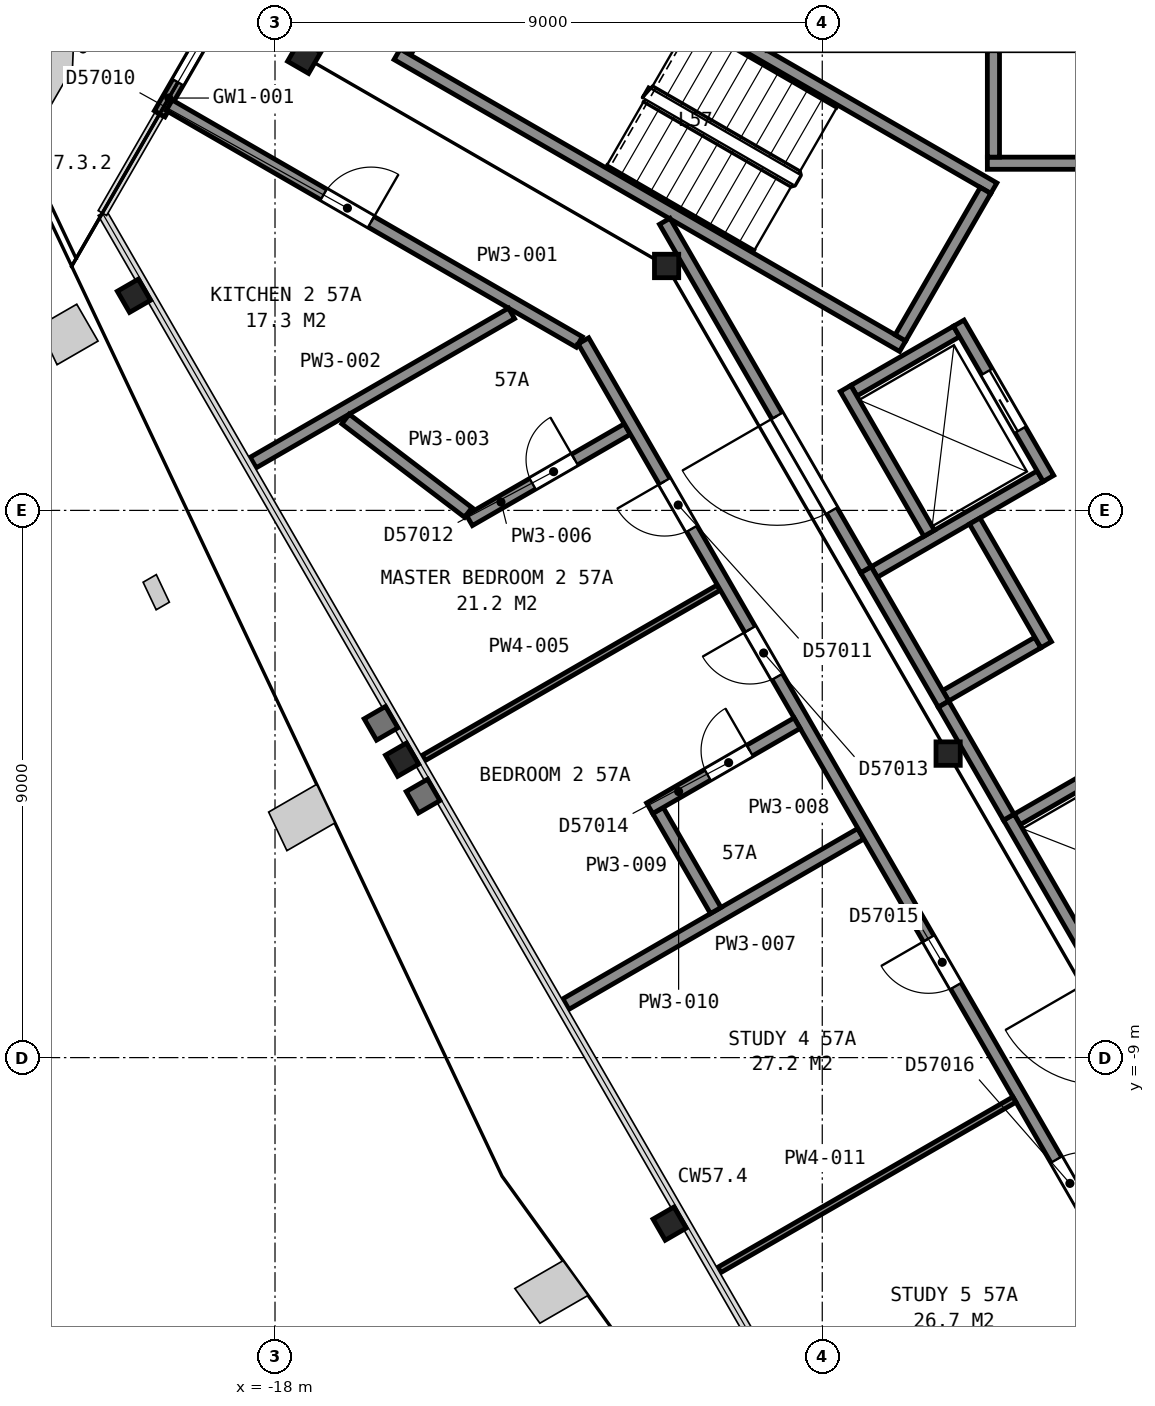
"""IFC4 building model, lengths in metres.
Left out: names, types, materials, properties, quantities, classifications, styles, units other than length and angle.
Written with IfcOpenShell. Run it as: python <this file> out.ifc"""

import sys

from ifc_helpers import new_model, si_unit, direction, frame, frame_2d, origin, origin_2d, place, context, subcontext, project, spatial, rectangle, i_section, extrude, element, fill, save


model = new_model("IFC4")
c1 = context("Model", 3, precision=1e-05, world=origin(), true_north=direction((0.0, 1.0)))
c2 = subcontext(c1, "Body", "Model", "MODEL_VIEW")
j1 = project(units=[si_unit("LENGTHUNIT", "METRE"), si_unit("PLANEANGLEUNIT", "RADIAN")], contexts=[c1])
p1 = place(None, origin())
s1 = spatial("IfcSite", under=j1, at=p1, CompositionType="ELEMENT")
p2 = place(p1, origin())
s2 = spatial("IfcBuilding", under=s1, at=p2, CompositionType="ELEMENT")
p3 = place(p2, frame((0.0, 0.0, 228.6)))
s3 = spatial("IfcBuildingStorey", under=s2, at=p3, CompositionType="ELEMENT", Elevation=228.6)
p4 = place(p3, frame((-20.32, 3.53, 0.0), z_axis=(0.0, 0.0, 1.0), x_axis=(-0.5, 0.866025403784, 0.0)))
e1 = element("IfcColumn", 1, at=p4, inside=s3, PredefinedType="COLUMN", context=c2, shape_type="SweptSolid", body=[
    extrude(i_section(OverallWidth=0.401, OverallDepth=0.399, WebThickness=0.025, FlangeThickness=0.04, FilletRadius=0.015, at=origin_2d()), origin(), (0.0, 0.0, 1.0), 3.66),
])
for number, where, z_axis, x_axis in (
    (2, (-15.91, -4.1, 0.0), (0.0, 0.0, 1.0), (-0.5, 0.866, 0.0)),
    (3, (-11.51, -11.73, 0.0), (0.0, 0.0, 1.0), (-0.5, 0.866, 0.0)),
):
    element("IfcColumn", number, at=place(p3, frame(where, z_axis=z_axis, x_axis=x_axis)), inside=s3, PredefinedType="COLUMN", context=c2, shape_type="SweptSolid", body=[
        extrude(i_section(OverallWidth=0.401, OverallDepth=0.399, WebThickness=0.025, FlangeThickness=0.04, FilletRadius=0.015, at=origin_2d()), origin(), (0.0, 0.0, 1.0), 3.665),
    ])
p5 = place(p3, frame((-17.52, 7.46, 0.0), z_axis=(0.0, 0.0, 1.0), x_axis=(0.5, 0.866025403784, 0.0)))
e4 = element("IfcColumn", 4, at=p5, inside=s3, PredefinedType="COLUMN", context=c2, shape_type="SweptSolid", body=[
    extrude(i_section(OverallWidth=0.401, OverallDepth=0.399, WebThickness=0.025, FlangeThickness=0.04, FilletRadius=0.015, at=origin_2d()), origin(), (0.0, 0.0, 1.0), 3.7),
])
for number, where, z_axis, x_axis in (
    (5, (-11.56, 4.02, 0.0), (0.0, 0.0, 1.0), (1.0, 0.0, 0.0)),
    (6, (-6.93, -4.0, 0.0), (0.0, 0.0, 1.0), (1.0, 0.0, 0.0)),
):
    element("IfcColumn", number, at=place(p3, frame(where, z_axis=z_axis, x_axis=x_axis)), inside=s3, PredefinedType="COLUMN", context=c2, shape_type="SweptSolid", body=[
        extrude(i_section(OverallWidth=0.399, OverallDepth=0.386, WebThickness=0.021, FlangeThickness=0.033, FilletRadius=0.015, at=origin_2d()), origin(), (0.0, 0.0, 1.0), 3.7),
    ])
p6 = place(p3, frame((-15.597, 13.97, 0.0), z_axis=(0.0, 0.0, 1.0), x_axis=(-0.500007509209, -0.866021068297, 0.0)))
e7 = element("IfcWall", 7, at=p6, inside=s3, PredefinedType="SOLIDWALL", context=c2, shape_type="SweptSolid", body=[
    extrude(rectangle(XDim=8.6, YDim=0.2, at=frame_2d((4.3, 0.0))), origin(), (0.0, 0.0, 1.0), 2.713),
])
p7 = place(p6, frame((0.6, 0.0, 0.9)))
e8 = element("IfcOpeningElement", 8, at=p7, cuts=e7, PredefinedType="OPENING", context=c2, shape_type="SweptSolid", body=[
    extrude(rectangle(XDim=1.0, YDim=1.5, at=frame_2d((0.5, 0.75))), frame((0.0, 0.11, 0.0), z_axis=(0.0, -1.0, 0.0), x_axis=(1.0, 0.0, 0.0)), (0.0, 0.0, 1.0), 0.22),
])
p8 = place(p6, frame((2.2, 0.0, 0.0)))
e9 = element("IfcOpeningElement", 9, at=p8, cuts=e7, PredefinedType="OPENING", context=c2, shape_type="SweptSolid", body=[
    extrude(rectangle(XDim=1.8, YDim=2.4, at=frame_2d((0.9, 1.2))), frame((0.0, 0.11, 0.0), z_axis=(0.0, -1.0, 0.0), x_axis=(1.0, 0.0, 0.0)), (0.0, 0.0, 1.0), 0.22),
])
p9 = place(p6, frame((4.6, 0.0, 0.0)))
e10 = element("IfcOpeningElement", 10, at=p9, cuts=e7, PredefinedType="OPENING", context=c2, shape_type="SweptSolid", body=[
    extrude(rectangle(XDim=1.8, YDim=2.4, at=frame_2d((0.9, 1.2))), frame((0.0, 0.11, 0.0), z_axis=(0.0, -1.0, 0.0), x_axis=(1.0, 0.0, 0.0)), (0.0, 0.0, 1.0), 0.22),
])
p10 = place(p6, frame((7.0, 0.0, 0.9)))
e11 = element("IfcOpeningElement", 11, at=p10, cuts=e7, PredefinedType="OPENING", context=c2, shape_type="SweptSolid", body=[
    extrude(rectangle(XDim=1.0, YDim=1.5, at=frame_2d((0.5, 0.75))), frame((0.0, 0.11, 0.0), z_axis=(0.0, -1.0, 0.0), x_axis=(1.0, 0.0, 0.0)), (0.0, 0.0, 1.0), 0.22),
])
p11 = place(p3, frame((-14.455, 9.962, 0.0), z_axis=(0.0, 0.0, 1.0), x_axis=(-0.500049511043, -0.865996816683, 0.0)))
e12 = element("IfcWall", 12, at=p11, inside=s3, PredefinedType="PARTITIONING", context=c2, shape_type="SweptSolid", body=[
    extrude(rectangle(XDim=2.8, YDim=0.2, at=frame_2d((1.4, 0.0))), origin(), (0.0, 0.0, 1.0), 3.45),
])
p12 = place(p11, frame((0.85, 0.0, 0.0)))
e13 = element("IfcOpeningElement", 13, at=p12, cuts=e12, PredefinedType="OPENING", context=c2, shape_type="SweptSolid", body=[
    extrude(rectangle(XDim=1.1, YDim=2.1, at=frame_2d((0.55, 1.05))), frame((0.0, 0.11, 0.0), z_axis=(0.0, -1.0, 0.0), x_axis=(1.0, 0.0, 0.0)), (0.0, 0.0, 1.0), 0.22),
])
for number, where, z_axis, x_axis in (
    (14, (-7.678, 2.701, 0.0), (0.0, 0.0, 1.0), (-0.866, 0.5, 0.0)),
    (15, (-6.178, 5.299, 0.0), (0.0, 0.0, 1.0), (-0.866, 0.5, 0.0)),
):
    element("IfcWall", number, at=place(p3, frame(where, z_axis=z_axis, x_axis=x_axis)), inside=s3, PredefinedType="PARTITIONING", context=c2, shape_type="SweptSolid", body=[
        extrude(rectangle(XDim=9.6, YDim=0.2, at=frame_2d((4.8, 0.0))), origin(), (0.0, 0.0, 1.0), 3.45),
    ])
p13 = place(p3, frame((-6.315, 5.262, 0.0), z_axis=(0.0, 0.0, 1.0), x_axis=(-0.500049511043, -0.865996816683, 0.0)))
e16 = element("IfcWall", 16, at=p13, inside=s3, PredefinedType="PARTITIONING", context=c2, shape_type="SweptSolid", body=[
    extrude(rectangle(XDim=2.8, YDim=0.2, at=frame_2d((1.4, 0.0))), origin(), (0.0, 0.0, 1.0), 3.45),
])
p14 = place(p3, frame((-6.285, 5.71, 0.0), z_axis=(0.0, 0.0, 1.0), x_axis=(1.0, 0.0, 0.0)))
e17 = element("IfcWall", 17, at=p14, inside=s3, PredefinedType="PARTITIONING", context=c2, shape_type="SweptSolid", body=[
    extrude(rectangle(XDim=2.35, YDim=0.2, at=frame_2d((1.175, 0.0))), origin(), (0.0, 0.0, 1.0), 3.7),
])
for number, where, z_axis, x_axis in (
    (18, (-5.795, -5.083, 0.0), (0.0, 0.0, 1.0), (0.866, 0.5, 0.0)),
    (19, (-6.97, -3.048, 0.0), (0.0, 0.0, 1.0), (0.866, 0.5, 0.0)),
):
    element("IfcWall", number, at=place(p3, frame(where, z_axis=z_axis, x_axis=x_axis)), inside=s3, PredefinedType="PARTITIONING", context=c2, shape_type="SweptSolid", body=[
        extrude(rectangle(XDim=1.75, YDim=0.2, at=frame_2d((0.875, 0.0))), origin(), (0.0, 0.0, 1.0), 3.7),
    ])
p15 = place(p3, frame((-8.145, -1.013, 0.0), z_axis=(0.0, 0.0, 1.0), x_axis=(0.866016494683, 0.500015430699, 0.0)))
e20 = element("IfcWall", 20, at=p15, inside=s3, PredefinedType="PARTITIONING", context=c2, shape_type="SweptSolid", body=[
    extrude(rectangle(XDim=3.15, YDim=0.2, at=frame_2d((1.575, 0.0))), origin(), (0.0, 0.0, 1.0), 3.7),
])
p16 = place(p3, frame((-8.48, 1.969, 0.0), z_axis=(0.0, 0.0, 1.0), x_axis=(0.866000020948, 0.500043961785, 0.0)))
e21 = element("IfcWall", 21, at=p16, inside=s3, PredefinedType="PARTITIONING", context=c2, shape_type="SweptSolid", body=[
    extrude(rectangle(XDim=1.95, YDim=0.2, at=frame_2d((0.975, 0.0))), origin(), (0.0, 0.0, 1.0), 3.7),
])
p17 = place(p3, frame((-6.185, 5.81, 0.0), z_axis=(0.0, 0.0, 1.0), x_axis=(0.0, 1.0, 0.0)))
e22 = element("IfcWall", 22, at=p17, inside=s3, PredefinedType="PARTITIONING", context=c2, shape_type="SweptSolid", body=[
    extrude(rectangle(XDim=1.75, YDim=0.2, at=frame_2d((0.875, 0.0))), origin(), (0.0, 0.0, 1.0), 3.7),
])
p18 = place(p3, frame((-5.28, 0.525, 0.0), z_axis=(0.0, 0.0, 1.0), x_axis=(-0.500037662692, 0.866003658127, 0.0)))
e23 = element("IfcWall", 23, at=p18, inside=s3, PredefinedType="PARTITIONING", context=c2, shape_type="SweptSolid", body=[
    extrude(rectangle(XDim=2.95, YDim=0.2, at=frame_2d((1.475, 0.0))), origin(), (0.0, 0.0, 1.0), 3.7),
])
p19 = place(p18, frame((0.925, 0.0, 0.0)))
e24 = element("IfcOpeningElement", 24, at=p19, cuts=e23, PredefinedType="OPENING", context=c2, shape_type="SweptSolid", body=[
    extrude(rectangle(XDim=1.1, YDim=2.1, at=frame_2d((0.55, 1.05))), frame((0.0, 0.11, 0.0), z_axis=(0.0, -1.0, 0.0), x_axis=(1.0, 0.0, 0.0)), (0.0, 0.0, 1.0), 0.22),
])
p20 = place(p3, frame((-5.318, -2.21, 0.0), z_axis=(0.0, 0.0, 1.0), x_axis=(-0.499938297808, 0.866061024631, 0.0)))
e25 = element("IfcWall", 25, at=p20, inside=s3, PredefinedType="PARTITIONING", context=c2, shape_type="SweptSolid", body=[
    extrude(rectangle(XDim=2.35, YDim=0.2, at=frame_2d((1.175, 0.0))), origin(), (0.0, 0.0, 1.0), 3.7),
])
p21 = place(p3, frame((-7.242, -0.376, 0.0), z_axis=(0.0, 0.0, 1.0), x_axis=(-0.499996545922, 0.866027397988, 0.0)))
e26 = element("IfcWall", 26, at=p21, inside=s3, PredefinedType="PARTITIONING", context=c2, shape_type="SweptSolid", body=[
    extrude(rectangle(XDim=2.75, YDim=0.2, at=frame_2d((1.375, 0.0))), origin(), (0.0, 0.0, 1.0), 3.7),
])
for number, where, z_axis, x_axis in (
    (27, (-4.656, -7.255, 0.0), (0.0, 0.0, 1.0), (-0.5, 0.866, 0.0)),
    (28, (-7.006, -3.185, 0.0), (0.0, 0.0, 1.0), (-0.5, 0.866, 0.0)),
):
    element("IfcWall", number, at=place(p3, frame(where, z_axis=z_axis, x_axis=x_axis)), inside=s3, PredefinedType="PARTITIONING", context=c2, shape_type="SweptSolid", body=[
        extrude(rectangle(XDim=2.55, YDim=0.2, at=frame_2d((1.275, 0.0))), origin(), (0.0, 0.0, 1.0), 3.7),
    ])
p22 = place(p3, frame((-11.591, 4.755, 0.0), z_axis=(0.0, 0.0, 1.0), x_axis=(0.500043977787, -0.866000011708, 0.0)))
e29 = element("IfcWall", 29, at=p22, inside=s3, PredefinedType="PARTITIONING", context=c2, shape_type="SweptSolid", body=[
    extrude(rectangle(XDim=6.617, YDim=0.2, at=frame_2d((3.308, 0.0))), origin(), (0.0, 0.0, 1.0), 3.45),
])
p23 = place(p22, frame((3.695, 0.0, 0.0)))
e30 = element("IfcOpeningElement", 30, at=p23, cuts=e29, PredefinedType="OPENING", context=c2, shape_type="SweptSolid", body=[
    extrude(rectangle(XDim=1.8, YDim=2.1, at=frame_2d((0.9, 1.05))), frame((0.0, 0.11, 0.0), z_axis=(0.0, -1.0, 0.0), x_axis=(1.0, 0.0, 0.0)), (0.0, 0.0, 1.0), 0.22),
])
p24 = place(p3, frame((-7.005, -3.187, 0.0), z_axis=(0.0, 0.0, 1.0), x_axis=(0.499689606989, -0.866204535123, 0.0)))
e31 = element("IfcWall", 31, at=p24, inside=s3, PredefinedType="PARTITIONING", context=c2, shape_type="SweptSolid", body=[
    extrude(rectangle(XDim=2.145, YDim=0.2, at=frame_2d((1.072, 0.0))), origin(), (0.0, 0.0, 1.0), 3.45),
])
p25 = place(p3, frame((-12.995, 2.77, 0.0), z_axis=(0.0, 0.0, 1.0), x_axis=(-0.866060835767, 0.499938624983, 0.0)))
e32 = element("IfcWall", 32, at=p25, inside=s3, PredefinedType="PARTITIONING", context=c2, shape_type="SweptSolid", body=[
    extrude(rectangle(XDim=7.789, YDim=0.2, at=frame_2d((3.894, 0.0))), origin(), (0.0, 0.0, 1.0), 2.713),
])
p26 = place(p25, frame((3.954, 0.0, 0.0)))
e33 = element("IfcOpeningElement", 33, at=p26, cuts=e32, PredefinedType="OPENING", context=c2, shape_type="SweptSolid", body=[
    extrude(rectangle(XDim=0.9, YDim=2.1, at=frame_2d((0.45, 1.05))), frame((0.0, 0.11, 0.0), z_axis=(0.0, -1.0, 0.0), x_axis=(1.0, 0.0, 0.0)), (0.0, 0.0, 1.0), 0.22),
])
p27 = place(p3, frame((-18.359, 0.787, 0.0), z_axis=(0.0, 0.0, 1.0), x_axis=(0.86596515875, 0.500104332946, 0.0)))
e34 = element("IfcWall", 34, at=p27, inside=s3, PredefinedType="PARTITIONING", context=c2, shape_type="SweptSolid", body=[
    extrude(rectangle(XDim=4.907, YDim=0.2, at=frame_2d((2.453, 0.0))), origin(), (0.0, 0.0, 1.0), 2.713),
])
p28 = place(p3, frame((-16.84, 1.503, 0.0), z_axis=(0.0, 0.0, 1.0), x_axis=(0.79576722268, -0.605602615012, 0.0)))
e35 = element("IfcWall", 35, at=p28, inside=s3, PredefinedType="PARTITIONING", context=c2, shape_type="SweptSolid", body=[
    extrude(rectangle(XDim=2.538, YDim=0.2, at=frame_2d((1.269, 0.0))), origin(), (0.0, 0.0, 1.0), 2.713),
])
p29 = place(p3, frame((-15.555, -4.071, 0.0), z_axis=(0.0, 0.0, 1.0), x_axis=(0.866083225238, 0.499899836928, 0.0)))
e36 = element("IfcWall", 36, at=p29, inside=s3, PredefinedType="PARTITIONING", context=c2, shape_type="SweptSolid", body=[
    extrude(rectangle(XDim=5.6, YDim=0.1, at=frame_2d((2.8, 0.0))), origin(), (0.0, 0.0, 1.0), 2.713),
])
p30 = place(p3, frame((-14.804, -0.163, 0.0), z_axis=(0.0, 0.0, 1.0), x_axis=(0.866031096941, 0.499990139034, 0.0)))
e37 = element("IfcWall", 37, at=p30, inside=s3, PredefinedType="PARTITIONING", context=c2, shape_type="SweptSolid", body=[
    extrude(rectangle(XDim=3.0, YDim=0.2, at=frame_2d((1.5, 0.0))), origin(), (0.0, 0.0, 1.0), 2.713),
])
p31 = place(p30, frame((1.2, 0.0, 0.0)))
e38 = element("IfcOpeningElement", 38, at=p31, cuts=e37, PredefinedType="OPENING", context=c2, shape_type="SweptSolid", body=[
    extrude(rectangle(XDim=0.8, YDim=2.1, at=frame_2d((0.4, 1.05))), frame((0.0, 0.11, 0.0), z_axis=(0.0, -1.0, 0.0), x_axis=(1.0, 0.0, 0.0)), (0.0, 0.0, 1.0), 0.22),
])
p32 = place(p3, frame((-13.217, -8.12, 0.0), z_axis=(0.0, 0.0, 1.0), x_axis=(0.865964107429, 0.500106153376, 0.0)))
e39 = element("IfcWall", 39, at=p32, inside=s3, PredefinedType="PARTITIONING", context=c2, shape_type="SweptSolid", body=[
    extrude(rectangle(XDim=5.599, YDim=0.2, at=frame_2d((2.8, 0.0))), origin(), (0.0, 0.0, 1.0), 2.713),
])
p33 = place(p3, frame((-4.075, -12.545, 0.0), z_axis=(0.0, 0.0, 1.0), x_axis=(-0.499997769292, 0.86602669168, 0.0)))
e40 = element("IfcWall", 40, at=p33, inside=s3, PredefinedType="PARTITIONING", context=c2, shape_type="SweptSolid", body=[
    extrude(rectangle(XDim=17.706, YDim=0.2, at=frame_2d((8.853, 0.0))), origin(), (0.0, 0.0, 1.0), 2.713),
])
p34 = place(p33, frame((14.138, 0.0, 0.0)))
e41 = element("IfcOpeningElement", 41, at=p34, cuts=e40, PredefinedType="OPENING", context=c2, shape_type="SweptSolid", body=[
    extrude(rectangle(XDim=0.9, YDim=2.1, at=frame_2d((0.45, 1.05))), frame((0.0, 0.11, 0.0), z_axis=(0.0, -1.0, 0.0), x_axis=(1.0, 0.0, 0.0)), (0.0, 0.0, 1.0), 0.22),
])
p35 = place(p33, frame((11.328, 0.0, 0.0)))
e42 = element("IfcOpeningElement", 42, at=p35, cuts=e40, PredefinedType="OPENING", context=c2, shape_type="SweptSolid", body=[
    extrude(rectangle(XDim=0.9, YDim=2.1, at=frame_2d((0.45, 1.05))), frame((0.0, 0.11, 0.0), z_axis=(0.0, -1.0, 0.0), x_axis=(1.0, 0.0, 0.0)), (0.0, 0.0, 1.0), 0.22),
])
p36 = place(p33, frame((5.454, 0.0, 0.0)))
e43 = element("IfcOpeningElement", 43, at=p36, cuts=e40, PredefinedType="OPENING", context=c2, shape_type="SweptSolid", body=[
    extrude(rectangle(XDim=0.9, YDim=2.1, at=frame_2d((0.45, 1.05))), frame((0.0, 0.11, 0.0), z_axis=(0.0, -1.0, 0.0), x_axis=(1.0, 0.0, 0.0)), (0.0, 0.0, 1.0), 0.22),
])
p37 = place(p33, frame((1.255, 0.0, 0.0)))
e44 = element("IfcOpeningElement", 44, at=p37, cuts=e40, PredefinedType="OPENING", context=c2, shape_type="SweptSolid", body=[
    extrude(rectangle(XDim=0.9, YDim=2.1, at=frame_2d((0.45, 1.05))), frame((0.0, 0.11, 0.0), z_axis=(0.0, -1.0, 0.0), x_axis=(1.0, 0.0, 0.0)), (0.0, 0.0, 1.0), 0.22),
])
p38 = place(p3, frame((-11.702, -4.936, 0.0), z_axis=(0.0, 0.0, 1.0), x_axis=(0.500134112126, -0.865947960265, 0.0)))
e45 = element("IfcWall", 45, at=p38, inside=s3, PredefinedType="PARTITIONING", context=c2, shape_type="SweptSolid", body=[
    extrude(rectangle(XDim=1.899, YDim=0.2, at=frame_2d((0.95, 0.0))), origin(), (0.0, 0.0, 1.0), 2.713),
])
p39 = place(p3, frame((-9.414, -3.499, 0.0), z_axis=(0.0, 0.0, 1.0), x_axis=(-0.866056369097, -0.49994636267, 0.0)))
e46 = element("IfcWall", 46, at=p39, inside=s3, PredefinedType="PARTITIONING", context=c2, shape_type="SweptSolid", body=[
    extrude(rectangle(XDim=2.8, YDim=0.2, at=frame_2d((1.4, 0.0))), origin(), (0.0, 0.0, 1.0), 2.713),
])
p40 = place(p39, frame((0.9, 0.0, 0.0)))
e47 = element("IfcOpeningElement", 47, at=p40, cuts=e46, PredefinedType="OPENING", context=c2, shape_type="SweptSolid", body=[
    extrude(rectangle(XDim=0.8, YDim=2.1, at=frame_2d((0.4, 1.05))), frame((0.0, 0.11, 0.0), z_axis=(0.0, -1.0, 0.0), x_axis=(1.0, 0.0, 0.0)), (0.0, 0.0, 1.0), 0.22),
])
p41 = place(p3, frame((-10.693, -12.492, 0.0), z_axis=(0.0, 0.0, 1.0), x_axis=(0.866017266313, 0.500014094249, 0.0)))
e48 = element("IfcWall", 48, at=p41, inside=s3, PredefinedType="PARTITIONING", context=c2, shape_type="SweptSolid", body=[
    extrude(rectangle(XDim=5.604, YDim=0.1, at=frame_2d((2.802, 0.0))), origin(), (0.0, 0.0, 1.0), 2.713),
])
p42 = place(p10, origin())
e49 = element("IfcWindow", 49, at=p42, inside=s3, PartitioningType="SINGLE_PANEL", PredefinedType="WINDOW", context=c2, shape_type="SweptSolid", body=[
    extrude(rectangle(XDim=1.0, YDim=1.5, at=frame_2d((0.5, 0.75))), frame((0.0, 0.03, 0.0), z_axis=(0.0, -1.0, 0.0), x_axis=(1.0, 0.0, 0.0)), (0.0, 0.0, 1.0), 0.06),
])
fill(e11, e49)
p43 = place(p19, origin())
e50 = element("IfcDoor", 50, at=p43, inside=s3, OperationType="SLIDING_TO_LEFT", PredefinedType="DOOR", context=c2, shape_type="SweptSolid", body=[
    extrude(rectangle(XDim=1.1, YDim=2.1, at=frame_2d((0.55, 1.05))), frame((0.0, 0.025, 0.0), z_axis=(0.0, -1.0, 0.0), x_axis=(1.0, 0.0, 0.0)), (0.0, 0.0, 1.0), 0.05),
])
fill(e24, e50)
p44 = place(p23, origin())
e51 = element("IfcDoor", 51, at=p44, inside=s3, OperationType="DOUBLE_DOOR_SINGLE_SWING", PredefinedType="DOOR", context=c2, shape_type="SweptSolid", body=[
    extrude(rectangle(XDim=1.8, YDim=2.1, at=frame_2d((0.9, 1.05))), frame((0.0, 0.025, 0.0), z_axis=(0.0, -1.0, 0.0), x_axis=(1.0, 0.0, 0.0)), (0.0, 0.0, 1.0), 0.05),
])
fill(e30, e51)
p45 = place(p26, origin())
e52 = element("IfcDoor", 52, at=p45, inside=s3, OperationType="SINGLE_SWING_LEFT", PredefinedType="DOOR", context=c2, shape_type="SweptSolid", body=[
    extrude(rectangle(XDim=0.9, YDim=2.1, at=frame_2d((0.45, 1.05))), frame((0.0, 0.025, 0.0), z_axis=(0.0, -1.0, 0.0), x_axis=(1.0, 0.0, 0.0)), (0.0, 0.0, 1.0), 0.05),
])
fill(e33, e52)
p46 = place(p31, origin())
e53 = element("IfcDoor", 53, at=p46, inside=s3, OperationType="SINGLE_SWING_RIGHT", PredefinedType="DOOR", context=c2, shape_type="SweptSolid", body=[
    extrude(rectangle(XDim=0.8, YDim=2.1, at=frame_2d((0.4, 1.05))), frame((0.0, 0.025, 0.0), z_axis=(0.0, -1.0, 0.0), x_axis=(1.0, 0.0, 0.0)), (0.0, 0.0, 1.0), 0.05),
])
fill(e38, e53)
p47 = place(p34, origin())
e54 = element("IfcDoor", 54, at=p47, inside=s3, OperationType="SINGLE_SWING_RIGHT", PredefinedType="DOOR", context=c2, shape_type="SweptSolid", body=[
    extrude(rectangle(XDim=0.9, YDim=2.1, at=frame_2d((0.45, 1.05))), frame((0.0, 0.025, 0.0), z_axis=(0.0, -1.0, 0.0), x_axis=(1.0, 0.0, 0.0)), (0.0, 0.0, 1.0), 0.05),
])
fill(e41, e54)
p48 = place(p35, origin())
e55 = element("IfcDoor", 55, at=p48, inside=s3, OperationType="SINGLE_SWING_RIGHT", PredefinedType="DOOR", context=c2, shape_type="SweptSolid", body=[
    extrude(rectangle(XDim=0.9, YDim=2.1, at=frame_2d((0.45, 1.05))), frame((0.0, 0.025, 0.0), z_axis=(0.0, -1.0, 0.0), x_axis=(1.0, 0.0, 0.0)), (0.0, 0.0, 1.0), 0.05),
])
fill(e42, e55)
p49 = place(p36, origin())
e56 = element("IfcDoor", 56, at=p49, inside=s3, OperationType="SINGLE_SWING_RIGHT", PredefinedType="DOOR", context=c2, shape_type="SweptSolid", body=[
    extrude(rectangle(XDim=0.9, YDim=2.1, at=frame_2d((0.45, 1.05))), frame((0.0, 0.025, 0.0), z_axis=(0.0, -1.0, 0.0), x_axis=(1.0, 0.0, 0.0)), (0.0, 0.0, 1.0), 0.05),
])
fill(e43, e56)
p50 = place(p37, origin())
e57 = element("IfcDoor", 57, at=p50, inside=s3, OperationType="SINGLE_SWING_LEFT", PredefinedType="DOOR", context=c2, shape_type="SweptSolid", body=[
    extrude(rectangle(XDim=0.9, YDim=2.1, at=frame_2d((0.45, 1.05))), frame((0.0, 0.025, 0.0), z_axis=(0.0, -1.0, 0.0), x_axis=(1.0, 0.0, 0.0)), (0.0, 0.0, 1.0), 0.05),
])
fill(e44, e57)
p51 = place(p40, origin())
e58 = element("IfcDoor", 58, at=p51, inside=s3, OperationType="SINGLE_SWING_LEFT", PredefinedType="DOOR", context=c2, shape_type="SweptSolid", body=[
    extrude(rectangle(XDim=0.8, YDim=2.1, at=frame_2d((0.4, 1.05))), frame((0.0, 0.025, 0.0), z_axis=(0.0, -1.0, 0.0), x_axis=(1.0, 0.0, 0.0)), (0.0, 0.0, 1.0), 0.05),
])
fill(e47, e58)
save(model, sys.argv[1])
